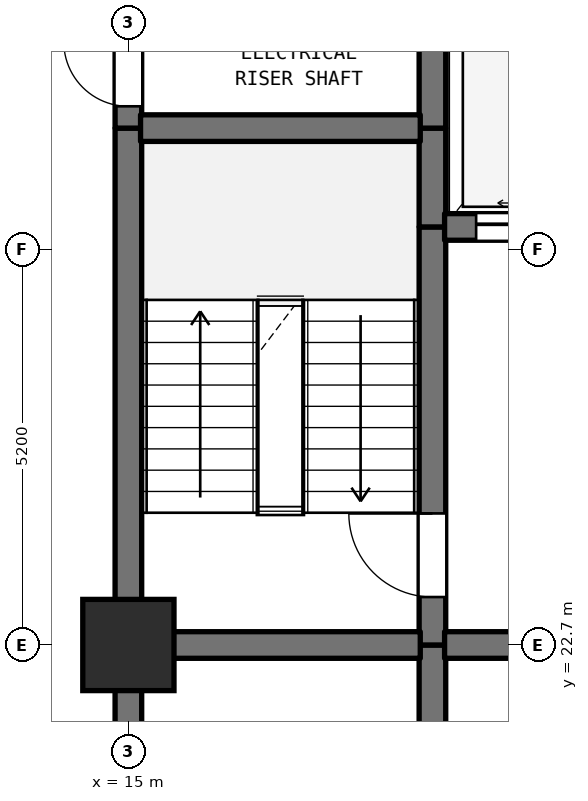
"""IFC4 building model, lengths in metres.
Left out: names, types, materials, properties, quantities, classifications, styles, units other than length and angle.
Written with IfcOpenShell. Run it as: python <this file> out.ifc"""

import sys

from ifc_helpers import new_model, si_unit, direction, frame, frame_2d, origin, origin_2d, place, context, subcontext, project, spatial, rectangle, extrude, element, fill, save


model = new_model("IFC4")
c1 = context("Model", 3, precision=1e-05, world=origin(), true_north=direction((0.0, 1.0)))
c2 = subcontext(c1, "Body", "Model", "MODEL_VIEW")
j1 = project(units=[si_unit("LENGTHUNIT", "METRE"), si_unit("PLANEANGLEUNIT", "RADIAN")], contexts=[c1])
p1 = place(None, origin())
s1 = spatial("IfcSite", under=j1, at=p1, CompositionType="ELEMENT")
p2 = place(p1, origin())
s2 = spatial("IfcBuilding", under=s1, at=p2, CompositionType="ELEMENT")
p3 = place(p2, frame((0.0, 0.0, 77.5)))
s3 = spatial("IfcBuildingStorey", under=s2, at=p3, CompositionType="ELEMENT", Elevation=77.5)
p4 = place(p3, frame((15.0, 22.7, 0.0), z_axis=(0.0, 0.0, 1.0), x_axis=(1.0, 0.0, 0.0)))
e1 = element("IfcColumn", 1, at=p4, inside=s3, PredefinedType="COLUMN", context=c2, shape_type="SweptSolid", body=[
    extrude(rectangle(XDim=1.2, YDim=1.2, at=origin_2d()), origin(), (0.0, 0.0, 1.0), 3.7),
])
p5 = place(p3, frame((15.0, 19.5, 0.0), z_axis=(0.0, 0.0, 1.0), x_axis=(0.0, 1.0, 0.0)))
e2 = element("IfcWall", 2, at=p5, inside=s3, PredefinedType="SHEAR", context=c2, shape_type="SweptSolid", body=[
    extrude(rectangle(XDim=3.2, YDim=0.35, at=frame_2d((1.6, 0.0))), origin(), (0.0, 0.0, 1.0), 3.28),
])
p6 = place(p3, frame((15.0, 22.7, 0.0), z_axis=(0.0, 0.0, 1.0), x_axis=(0.0, 1.0, 0.0)))
e3 = element("IfcWall", 3, at=p6, inside=s3, PredefinedType="SHEAR", context=c2, shape_type="SweptSolid", body=[
    extrude(rectangle(XDim=6.8, YDim=0.35, at=frame_2d((3.4, 0.0))), origin(), (0.0, 0.0, 1.0), 3.28),
])
p7 = place(p3, frame((15.0, 29.5, 0.0), z_axis=(0.0, 0.0, 1.0), x_axis=(0.0, 1.0, 0.0)))
e4 = element("IfcWall", 4, at=p7, inside=s3, PredefinedType="SHEAR", context=c2, shape_type="SweptSolid", body=[
    extrude(rectangle(XDim=1.6, YDim=0.35, at=frame_2d((0.8, 0.0))), origin(), (0.0, 0.0, 1.0), 3.28),
])
p8 = place(p7, frame((0.287, 0.0, 0.0)))
e5 = element("IfcOpeningElement", 5, at=p8, cuts=e4, PredefinedType="OPENING", context=c2, shape_type="SweptSolid", body=[
    extrude(rectangle(XDim=0.85, YDim=2.1, at=frame_2d((0.425, 1.05))), frame((0.0, 0.185, 0.0), z_axis=(0.0, -1.0, 0.0), x_axis=(1.0, 0.0, 0.0)), (0.0, 0.0, 1.0), 0.37),
])
p9 = place(p3, frame((19.0, 19.5, 0.0), z_axis=(0.0, 0.0, 1.0), x_axis=(0.0, 1.0, 0.0)))
e6 = element("IfcWall", 6, at=p9, inside=s3, PredefinedType="SHEAR", context=c2, shape_type="SweptSolid", body=[
    extrude(rectangle(XDim=3.2, YDim=0.35, at=frame_2d((1.6, 0.0))), origin(), (0.0, 0.0, 1.0), 3.28),
])
p10 = place(p3, frame((19.0, 22.7, 0.0), z_axis=(0.0, 0.0, 1.0), x_axis=(0.0, 1.0, 0.0)))
e7 = element("IfcWall", 7, at=p10, inside=s3, PredefinedType="SHEAR", context=c2, shape_type="SweptSolid", body=[
    extrude(rectangle(XDim=5.5, YDim=0.35, at=frame_2d((2.75, 0.0))), origin(), (0.0, 0.0, 1.0), 3.28),
])
p11 = place(p10, frame((0.631, 0.0, 0.0)))
e8 = element("IfcOpeningElement", 8, at=p11, cuts=e7, PredefinedType="OPENING", context=c2, shape_type="SweptSolid", body=[
    extrude(rectangle(XDim=1.1, YDim=2.15, at=frame_2d((0.55, 1.075))), frame((0.0, 0.185, 0.0), z_axis=(0.0, -1.0, 0.0), x_axis=(1.0, 0.0, 0.0)), (0.0, 0.0, 1.0), 0.37),
])
p12 = place(p3, frame((19.0, 28.2, 0.0), z_axis=(0.0, 0.0, 1.0), x_axis=(0.0, 1.0, 0.0)))
e9 = element("IfcWall", 9, at=p12, inside=s3, PredefinedType="SHEAR", context=c2, shape_type="SweptSolid", body=[
    extrude(rectangle(XDim=1.3, YDim=0.35, at=frame_2d((0.65, 0.0))), origin(), (0.0, 0.0, 1.0), 3.28),
])
p13 = place(p3, frame((19.0, 29.5, 0.0), z_axis=(0.0, 0.0, 1.0), x_axis=(0.0, 1.0, 0.0)))
e10 = element("IfcWall", 10, at=p13, inside=s3, PredefinedType="SHEAR", context=c2, shape_type="SweptSolid", body=[
    extrude(rectangle(XDim=5.5, YDim=0.35, at=frame_2d((2.75, 0.0))), origin(), (0.0, 0.0, 1.0), 3.28),
])
p14 = place(p13, frame((2.025, 0.0, 0.0)))
e11 = element("IfcOpeningElement", 11, at=p14, cuts=e10, PredefinedType="OPENING", context=c2, shape_type="SweptSolid", body=[
    extrude(rectangle(XDim=1.1, YDim=2.15, at=frame_2d((0.55, 1.075))), frame((0.0, 0.185, 0.0), z_axis=(0.0, -1.0, 0.0), x_axis=(1.0, 0.0, 0.0)), (0.0, 0.0, 1.0), 0.37),
])
p15 = place(p3, frame((15.16, 22.7, 0.0), z_axis=(0.0, 0.0, 1.0), x_axis=(1.0, 0.0, 0.0)))
e12 = element("IfcWall", 12, at=p15, inside=s3, PredefinedType="SHEAR", context=c2, shape_type="SweptSolid", body=[
    extrude(rectangle(XDim=3.68, YDim=0.35, at=frame_2d((1.84, 0.0))), origin(), (0.0, 0.0, 1.0), 3.28),
])
p16 = place(p3, frame((19.16, 22.7, 0.0), z_axis=(0.0, 0.0, 1.0), x_axis=(1.0, 0.0, 0.0)))
e13 = element("IfcWall", 13, at=p16, inside=s3, PredefinedType="SHEAR", context=c2, shape_type="SweptSolid", body=[
    extrude(rectangle(XDim=4.48, YDim=0.35, at=frame_2d((2.24, 0.0))), origin(), (0.0, 0.0, 1.0), 3.28),
])
p17 = place(p16, frame((1.64, 0.0, 0.0)))
e14 = element("IfcOpeningElement", 14, at=p17, cuts=e13, PredefinedType="OPENING", context=c2, shape_type="SweptSolid", body=[
    extrude(rectangle(XDim=1.2, YDim=2.2, at=frame_2d((0.6, 1.1))), frame((0.0, 0.185, 0.0), z_axis=(0.0, -1.0, 0.0), x_axis=(1.0, 0.0, 0.0)), (0.0, 0.0, 1.0), 0.37),
])
p18 = place(p3, frame((19.16, 28.2, 0.0), z_axis=(0.0, 0.0, 1.0), x_axis=(1.0, 0.0, 0.0)))
e15 = element("IfcWall", 15, at=p18, inside=s3, PredefinedType="SHEAR", context=c2, shape_type="SweptSolid", body=[
    extrude(rectangle(XDim=4.48, YDim=0.35, at=frame_2d((2.24, 0.0))), origin(), (0.0, 0.0, 1.0), 3.28),
])
p19 = place(p18, frame((0.415, 0.0, 0.0)))
e16 = element("IfcOpeningElement", 16, at=p19, cuts=e15, PredefinedType="OPENING", context=c2, shape_type="SweptSolid", body=[
    extrude(rectangle(XDim=1.25, YDim=2.2, at=frame_2d((0.625, 1.1))), frame((0.0, 0.185, 0.0), z_axis=(0.0, -1.0, 0.0), x_axis=(1.0, 0.0, 0.0)), (0.0, 0.0, 1.0), 0.37),
])
p20 = place(p18, frame((2.815, 0.0, 0.0)))
e17 = element("IfcOpeningElement", 17, at=p20, cuts=e15, PredefinedType="OPENING", context=c2, shape_type="SweptSolid", body=[
    extrude(rectangle(XDim=1.25, YDim=2.2, at=frame_2d((0.625, 1.1))), frame((0.0, 0.185, 0.0), z_axis=(0.0, -1.0, 0.0), x_axis=(1.0, 0.0, 0.0)), (0.0, 0.0, 1.0), 0.37),
])
p21 = place(p3, frame((15.16, 29.5, 0.0), z_axis=(0.0, 0.0, 1.0), x_axis=(1.0, 0.0, 0.0)))
e18 = element("IfcWall", 18, at=p21, inside=s3, PredefinedType="SHEAR", context=c2, shape_type="SweptSolid", body=[
    extrude(rectangle(XDim=3.68, YDim=0.35, at=frame_2d((1.84, 0.0))), origin(), (0.0, 0.0, 1.0), 3.28),
])
p22 = place(p8, origin())
e19 = element("IfcDoor", 19, at=p22, inside=s3, OperationType="SINGLE_SWING_RIGHT", PredefinedType="DOOR", context=c2, shape_type="SweptSolid", body=[
    extrude(rectangle(XDim=0.85, YDim=2.1, at=frame_2d((0.425, 1.05))), frame((0.0, 0.025, 0.0), z_axis=(0.0, -1.0, 0.0), x_axis=(1.0, 0.0, 0.0)), (0.0, 0.0, 1.0), 0.05),
])
fill(e5, e19)
p23 = place(p11, origin())
e20 = element("IfcDoor", 20, at=p23, inside=s3, OperationType="SINGLE_SWING_RIGHT", PredefinedType="DOOR", context=c2, shape_type="SweptSolid", body=[
    extrude(rectangle(XDim=1.1, YDim=2.15, at=frame_2d((0.55, 1.075))), frame((0.0, 0.025, 0.0), z_axis=(0.0, -1.0, 0.0), x_axis=(1.0, 0.0, 0.0)), (0.0, 0.0, 1.0), 0.05),
])
fill(e8, e20)
p24 = place(p19, origin())
e21 = element("IfcDoor", 21, at=p24, inside=s3, OperationType="DOUBLE_DOOR_SLIDING", PredefinedType="DOOR", context=c2, shape_type="SweptSolid", body=[
    extrude(rectangle(XDim=1.25, YDim=2.2, at=frame_2d((0.625, 1.1))), frame((0.0, 0.025, 0.0), z_axis=(0.0, -1.0, 0.0), x_axis=(1.0, 0.0, 0.0)), (0.0, 0.0, 1.0), 0.05),
])
fill(e16, e21)
save(model, sys.argv[1])
